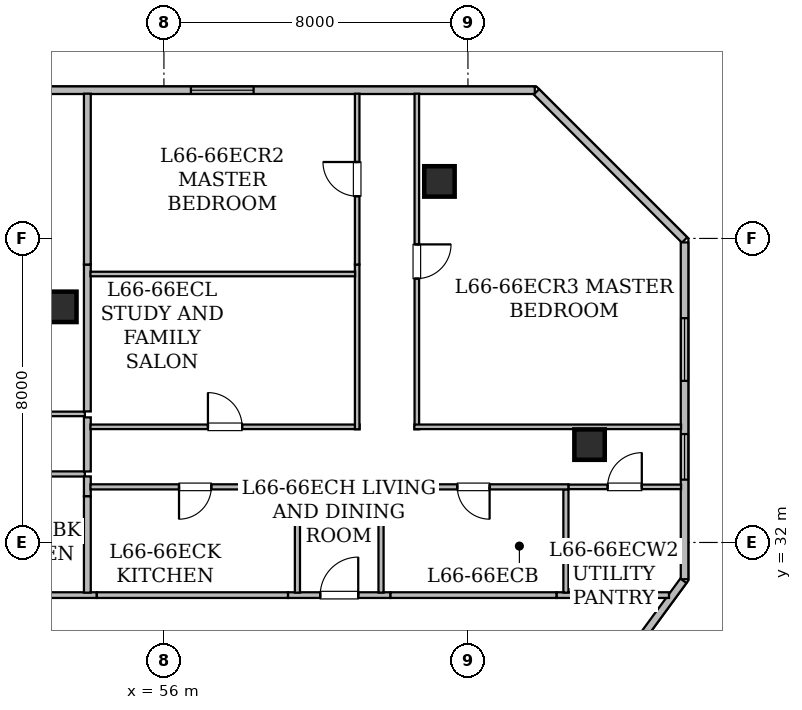
"""IFC4 building model, lengths in metres.
Left out: names, types, materials, properties, quantities, classifications, styles, units other than length and angle.
Written with IfcOpenShell. Run it as: python <this file> out.ifc"""

import sys

from ifc_helpers import new_model, si_unit, direction, frame, frame_2d, origin, origin_2d, place, context, subcontext, project, spatial, rectangle, hollow_rectangle, extrude, element, fill, save


model = new_model("IFC4")
c1 = context("Model", 3, precision=1e-05, world=origin(), true_north=direction((0.0, 1.0)))
c2 = subcontext(c1, "Body", "Model", "MODEL_VIEW")
j1 = project(units=[si_unit("LENGTHUNIT", "METRE"), si_unit("PLANEANGLEUNIT", "RADIAN")], contexts=[c1])
p1 = place(None, origin())
s1 = spatial("IfcSite", under=j1, at=p1, CompositionType="ELEMENT")
p2 = place(p1, origin())
s2 = spatial("IfcBuilding", under=s1, at=p2, CompositionType="ELEMENT")
p3 = place(p2, frame((0.0, 0.0, 257.35)))
s3 = spatial("IfcBuildingStorey", under=s2, at=p3, CompositionType="ELEMENT", Elevation=257.35)
for number, where, z_axis, x_axis in (
    (1, (63.25, 41.5, 0.0), (0.0, 0.0, 1.0), (1.0, 0.0, 0.0)),
    (2, (67.2, 34.575, 0.0), (0.0, 0.0, 1.0), (1.0, 0.0, 0.0)),
    (3, (53.3, 38.2, 0.0), (0.0, 0.0, 1.0), (1.0, 0.0, 0.0)),
):
    element("IfcColumn", number, at=place(p3, frame(where, z_axis=z_axis, x_axis=x_axis)), inside=s3, PredefinedType="COLUMN", context=c2, shape_type="SweptSolid", body=[
        extrude(hollow_rectangle(XDim=0.8, YDim=0.8, WallThickness=0.04, at=origin_2d()), origin(), (0.0, 0.0, 1.0), 3.65),
    ])
p4 = place(p3, frame((24.302, 43.9, 0.0), z_axis=(0.0, 0.0, 1.0), x_axis=(1.0, 0.0, 0.0)))
e4 = element("IfcWall", 4, at=p4, inside=s3, PredefinedType="STANDARD", context=c2, shape_type="SweptSolid", body=[
    extrude(rectangle(XDim=41.457, YDim=0.2, at=frame_2d((20.729, 0.0))), origin(), (0.0, 0.0, 1.0), 3.43),
])
p5 = place(p4, frame((0.604, 0.0, 0.85)))
e5 = element("IfcOpeningElement", 5, at=p5, cuts=e4, PredefinedType="OPENING", context=c2, shape_type="SweptSolid", body=[
    extrude(rectangle(XDim=1.65, YDim=1.55, at=frame_2d((0.825, 0.775))), frame((0.0, 0.11, 0.0), z_axis=(0.0, -1.0, 0.0), x_axis=(1.0, 0.0, 0.0)), (0.0, 0.0, 1.0), 0.22),
])
p6 = place(p4, frame((9.098, 0.0, 0.85)))
e6 = element("IfcOpeningElement", 6, at=p6, cuts=e4, PredefinedType="OPENING", context=c2, shape_type="SweptSolid", body=[
    extrude(rectangle(XDim=1.65, YDim=1.55, at=frame_2d((0.825, 0.775))), frame((0.0, 0.11, 0.0), z_axis=(0.0, -1.0, 0.0), x_axis=(1.0, 0.0, 0.0)), (0.0, 0.0, 1.0), 0.22),
])
p7 = place(p4, frame((14.405, 0.0, 0.85)))
e7 = element("IfcOpeningElement", 7, at=p7, cuts=e4, PredefinedType="OPENING", context=c2, shape_type="SweptSolid", body=[
    extrude(rectangle(XDim=1.65, YDim=1.55, at=frame_2d((0.825, 0.775))), frame((0.0, 0.11, 0.0), z_axis=(0.0, -1.0, 0.0), x_axis=(1.0, 0.0, 0.0)), (0.0, 0.0, 1.0), 0.22),
])
p8 = place(p4, frame((22.898, 0.0, 0.8)))
e8 = element("IfcOpeningElement", 8, at=p8, cuts=e4, PredefinedType="OPENING", context=c2, shape_type="SweptSolid", body=[
    extrude(rectangle(XDim=1.2, YDim=1.5, at=frame_2d((0.6, 0.75))), frame((0.0, 0.11, 0.0), z_axis=(0.0, -1.0, 0.0), x_axis=(1.0, 0.0, 0.0)), (0.0, 0.0, 1.0), 0.22),
])
p9 = place(p4, frame((19.188, 0.0, 0.85)))
e9 = element("IfcOpeningElement", 9, at=p9, cuts=e4, PredefinedType="OPENING", context=c2, shape_type="SweptSolid", body=[
    extrude(rectangle(XDim=1.65, YDim=1.55, at=frame_2d((0.825, 0.775))), frame((0.0, 0.11, 0.0), z_axis=(0.0, -1.0, 0.0), x_axis=(1.0, 0.0, 0.0)), (0.0, 0.0, 1.0), 0.22),
])
p10 = place(p4, frame((26.158, 0.0, 0.85)))
e10 = element("IfcOpeningElement", 10, at=p10, cuts=e4, PredefinedType="OPENING", context=c2, shape_type="SweptSolid", body=[
    extrude(rectangle(XDim=1.65, YDim=1.55, at=frame_2d((0.825, 0.775))), frame((0.0, 0.11, 0.0), z_axis=(0.0, -1.0, 0.0), x_axis=(1.0, 0.0, 0.0)), (0.0, 0.0, 1.0), 0.22),
])
p11 = place(p4, frame((32.408, 0.0, 0.85)))
e11 = element("IfcOpeningElement", 11, at=p11, cuts=e4, PredefinedType="OPENING", context=c2, shape_type="SweptSolid", body=[
    extrude(rectangle(XDim=1.65, YDim=1.55, at=frame_2d((0.825, 0.775))), frame((0.0, 0.11, 0.0), z_axis=(0.0, -1.0, 0.0), x_axis=(1.0, 0.0, 0.0)), (0.0, 0.0, 1.0), 0.22),
])
p12 = place(p3, frame((65.802, 43.857, 0.0), z_axis=(0.0, 0.0, 1.0), x_axis=(0.707106781187, -0.707106781187, 0.0)))
e12 = element("IfcWall", 12, at=p12, inside=s3, PredefinedType="STANDARD", context=c2, shape_type="SweptSolid", body=[
    extrude(rectangle(XDim=5.512, YDim=0.2, at=frame_2d((2.756, 0.0))), origin(), (0.0, 0.0, 1.0), 3.43),
])
p13 = place(p3, frame((69.7, 39.896, 0.0), z_axis=(0.0, 0.0, 1.0), x_axis=(0.0, -1.0, 0.0)))
e13 = element("IfcWall", 13, at=p13, inside=s3, PredefinedType="STANDARD", context=c2, shape_type="SweptSolid", body=[
    extrude(rectangle(XDim=8.863, YDim=0.2, at=frame_2d((4.432, 0.0))), origin(), (0.0, 0.0, 1.0), 3.43),
])
p14 = place(p13, frame((5.043, 0.0, 0.8)))
e14 = element("IfcOpeningElement", 14, at=p14, cuts=e13, PredefinedType="OPENING", context=c2, shape_type="SweptSolid", body=[
    extrude(rectangle(XDim=1.2, YDim=1.5, at=frame_2d((0.6, 0.75))), frame((0.0, 0.11, 0.0), z_axis=(0.0, -1.0, 0.0), x_axis=(1.0, 0.0, 0.0)), (0.0, 0.0, 1.0), 0.22),
])
p15 = place(p13, frame((1.994, 0.0, 0.85)))
e15 = element("IfcOpeningElement", 15, at=p15, cuts=e13, PredefinedType="OPENING", context=c2, shape_type="SweptSolid", body=[
    extrude(rectangle(XDim=1.65, YDim=1.55, at=frame_2d((0.825, 0.775))), frame((0.0, 0.11, 0.0), z_axis=(0.0, -1.0, 0.0), x_axis=(1.0, 0.0, 0.0)), (0.0, 0.0, 1.0), 0.22),
])
p16 = place(p3, frame((69.67, 30.992, 0.0), z_axis=(0.0, 0.0, 1.0), x_axis=(-0.591320870733, -0.806436375566, 0.0)))
e16 = element("IfcWall", 16, at=p16, inside=s3, PredefinedType="STANDARD", context=c2, shape_type="SweptSolid", body=[
    extrude(rectangle(XDim=3.71, YDim=0.2, at=frame_2d((1.855, 0.0))), origin(), (0.0, 0.0, 1.0), 3.43),
])
p17 = place(p3, frame((49.149, 30.615, 0.0), z_axis=(0.0, 0.0, 1.0), x_axis=(1.0, 0.0, 0.0)))
e17 = element("IfcWall", 17, at=p17, inside=s3, PredefinedType="STANDARD", context=c2, shape_type="SweptSolid", body=[
    extrude(rectangle(XDim=5.085, YDim=0.15, at=frame_2d((2.542, 0.0))), origin(), (0.0, 0.0, 1.0), 2.725),
])
p18 = place(p3, frame((66.329, 30.615, 0.0), z_axis=(0.0, 0.0, 1.0), x_axis=(1.0, 0.0, 0.0)))
e18 = element("IfcWall", 18, at=p18, inside=s3, PredefinedType="STANDARD", context=c2, shape_type="SweptSolid", body=[
    extrude(rectangle(XDim=2.961, YDim=0.15, at=frame_2d((1.48, 0.0))), origin(), (0.0, 0.0, 1.0), 2.887),
])
p19 = place(p3, frame((59.264, 30.615, 0.0), z_axis=(0.0, 0.0, 1.0), x_axis=(1.0, 0.0, 0.0)))
e19 = element("IfcWall", 19, at=p19, inside=s3, PredefinedType="STANDARD", context=c2, shape_type="SweptSolid", body=[
    extrude(rectangle(XDim=2.698, YDim=0.15, at=frame_2d((1.349, 0.0))), origin(), (0.0, 0.0, 1.0), 3.43),
])
p20 = place(p19, frame((0.849, 0.0, 0.0)))
e20 = element("IfcOpeningElement", 20, at=p20, cuts=e19, PredefinedType="OPENING", context=c2, shape_type="SweptSolid", body=[
    extrude(rectangle(XDim=1.0, YDim=2.15, at=frame_2d((0.5, 1.075))), frame((0.0, 0.085, 0.0), z_axis=(0.0, -1.0, 0.0), x_axis=(1.0, 0.0, 0.0)), (0.0, 0.0, 1.0), 0.17),
])
p21 = place(p3, frame((61.962, 30.615, 0.0), z_axis=(0.0, 0.0, 1.0), x_axis=(1.0, 0.0, 0.0)))
e21 = element("IfcWall", 21, at=p21, inside=s3, PredefinedType="STANDARD", context=c2, shape_type="SweptSolid", body=[
    extrude(rectangle(XDim=4.367, YDim=0.15, at=frame_2d((2.184, 0.0))), origin(), (0.0, 0.0, 1.0), 3.43),
])
p22 = place(p3, frame((54.234, 30.615, 0.0), z_axis=(0.0, 0.0, 1.0), x_axis=(1.0, 0.0, 0.0)))
e22 = element("IfcWall", 22, at=p22, inside=s3, PredefinedType="STANDARD", context=c2, shape_type="SweptSolid", body=[
    extrude(rectangle(XDim=5.03, YDim=0.15, at=frame_2d((2.515, 0.0))), origin(), (0.0, 0.0, 1.0), 3.43),
])
p23 = place(p3, frame((53.92, 33.803, 0.0), z_axis=(0.0, 0.0, 1.0), x_axis=(-1.0, 0.0, 0.0)))
e23 = element("IfcWall", 23, at=p23, inside=s3, PredefinedType="PARTITIONING", context=c2, shape_type="SweptSolid", body=[
    extrude(rectangle(XDim=5.085, YDim=0.135, at=frame_2d((2.542, 0.0))), origin(), (0.0, 0.0, 1.0), 2.725),
])
p24 = place(p23, frame((2.118, 0.0, 0.0)))
e24 = element("IfcOpeningElement", 24, at=p24, cuts=e23, PredefinedType="OPENING", context=c2, shape_type="SweptSolid", body=[
    extrude(rectangle(XDim=0.85, YDim=2.1, at=frame_2d((0.425, 1.05))), frame((0.0, 0.077, 0.0), z_axis=(0.0, -1.0, 0.0), x_axis=(1.0, 0.0, 0.0)), (0.0, 0.0, 1.0), 0.155),
])
p25 = place(p3, frame((48.52, 35.383, 0.0), z_axis=(0.0, 0.0, 1.0), x_axis=(1.0, 0.0, 0.0)))
e25 = element("IfcWall", 25, at=p25, inside=s3, PredefinedType="PARTITIONING", context=c2, shape_type="SweptSolid", body=[
    extrude(rectangle(XDim=5.4, YDim=0.12, at=frame_2d((2.7, 0.0))), origin(), (0.0, 0.0, 1.0), 2.725),
])
p26 = place(p3, frame((53.985, 35.292, 0.0), z_axis=(0.0, 0.0, 1.0), x_axis=(0.0, -1.0, 0.0)))
e26 = element("IfcWall", 26, at=p26, inside=s3, PredefinedType="STANDARD", context=c2, shape_type="SweptSolid", body=[
    extrude(rectangle(XDim=1.424, YDim=0.18, at=frame_2d((0.712, 0.0))), origin(), (0.0, 0.0, 1.0), 3.43),
])
p27 = place(p3, frame((53.985, 33.738, 0.0), z_axis=(0.0, 0.0, 1.0), x_axis=(0.0, -1.0, 0.0)))
e27 = element("IfcWall", 27, at=p27, inside=s3, PredefinedType="STANDARD", context=c2, shape_type="SweptSolid", body=[
    extrude(rectangle(XDim=0.524, YDim=0.18, at=frame_2d((0.262, 0.0))), origin(), (0.0, 0.0, 1.0), 3.065),
])
p28 = place(p3, frame((53.985, 33.214, 0.0), z_axis=(0.0, 0.0, 1.0), x_axis=(0.0, -1.0, 0.0)))
e28 = element("IfcWall", 28, at=p28, inside=s3, PredefinedType="STANDARD", context=c2, shape_type="SweptSolid", body=[
    extrude(rectangle(XDim=2.534, YDim=0.18, at=frame_2d((1.267, 0.0))), origin(), (0.0, 0.0, 1.0), 3.43),
])
p29 = place(p3, frame((53.985, 39.313, 0.0), z_axis=(0.0, 0.0, 1.0), x_axis=(0.0, -1.0, 0.0)))
e29 = element("IfcWall", 29, at=p29, inside=s3, PredefinedType="STANDARD", context=c2, shape_type="SweptSolid", body=[
    extrude(rectangle(XDim=3.865, YDim=0.18, at=frame_2d((1.933, 0.0))), origin(), (0.0, 0.0, 1.0), 2.725),
])
p30 = place(p3, frame((53.985, 43.808, 0.0), z_axis=(0.0, 0.0, 1.0), x_axis=(0.0, -1.0, 0.0)))
e30 = element("IfcWall", 30, at=p30, inside=s3, PredefinedType="STANDARD", context=c2, shape_type="SweptSolid", body=[
    extrude(rectangle(XDim=4.495, YDim=0.18, at=frame_2d((2.248, 0.0))), origin(), (0.0, 0.0, 1.0), 2.887),
])
p31 = place(p3, frame((66.643, 33.463, 0.0), z_axis=(0.0, 0.0, 1.0), x_axis=(1.0, 0.0, 0.0)))
e31 = element("IfcWall", 31, at=p31, inside=s3, PredefinedType="PARTITIONING", context=c2, shape_type="SweptSolid", body=[
    extrude(rectangle(XDim=2.965, YDim=0.12, at=frame_2d((1.482, 0.0))), origin(), (0.0, 0.0, 1.0), 2.887),
])
p32 = place(p31, frame((1.032, 0.0, 0.0)))
e32 = element("IfcOpeningElement", 32, at=p32, cuts=e31, PredefinedType="OPENING", context=c2, shape_type="SweptSolid", body=[
    extrude(rectangle(XDim=0.9, YDim=2.1, at=frame_2d((0.45, 1.05))), frame((0.0, 0.07, 0.0), z_axis=(0.0, -1.0, 0.0), x_axis=(1.0, 0.0, 0.0)), (0.0, 0.0, 1.0), 0.14),
])
p33 = place(p3, frame((66.578, 30.68, 0.0), z_axis=(0.0, 0.0, 1.0), x_axis=(0.0, 1.0, 0.0)))
e33 = element("IfcWall", 33, at=p33, inside=s3, PredefinedType="PARTITIONING", context=c2, shape_type="SweptSolid", body=[
    extrude(rectangle(XDim=2.718, YDim=0.135, at=frame_2d((1.359, 0.0))), origin(), (0.0, 0.0, 1.0), 3.065),
])
p34 = place(p3, frame((66.643, 33.463, 0.0), z_axis=(0.0, 0.0, 1.0), x_axis=(-1.0, 0.0, 0.0)))
e34 = element("IfcWall", 34, at=p34, inside=s3, PredefinedType="PARTITIONING", context=c2, shape_type="SweptSolid", body=[
    extrude(rectangle(XDim=4.995, YDim=0.135, at=frame_2d((2.498, 0.0))), origin(), (0.0, 0.0, 1.0), 3.065),
])
p35 = place(p34, frame((2.073, 0.0, 0.0)))
e35 = element("IfcOpeningElement", 35, at=p35, cuts=e34, PredefinedType="OPENING", context=c2, shape_type="SweptSolid", body=[
    extrude(rectangle(XDim=0.85, YDim=2.1, at=frame_2d((0.425, 1.05))), frame((0.0, 0.077, 0.0), z_axis=(0.0, -1.0, 0.0), x_axis=(1.0, 0.0, 0.0)), (0.0, 0.0, 1.0), 0.155),
])
for number, where, z_axis, x_axis in (
    (36, (61.713, 33.528, 0.0), (0.0, 0.0, 1.0), (0.0, -1.0, 0.0)),
    (37, (59.513, 30.68, 0.0), (0.0, 0.0, 1.0), (0.0, 1.0, 0.0)),
):
    element("IfcWall", number, at=place(p3, frame(where, z_axis=z_axis, x_axis=x_axis)), inside=s3, PredefinedType="PARTITIONING", context=c2, shape_type="SweptSolid", body=[
        extrude(rectangle(XDim=2.848, YDim=0.135, at=frame_2d((1.424, 0.0))), origin(), (0.0, 0.0, 1.0), 3.065),
    ])
p36 = place(p3, frame((59.578, 33.463, 0.0), z_axis=(0.0, 0.0, 1.0), x_axis=(-1.0, 0.0, 0.0)))
e38 = element("IfcWall", 38, at=p36, inside=s3, PredefinedType="PARTITIONING", context=c2, shape_type="SweptSolid", body=[
    extrude(rectangle(XDim=5.511, YDim=0.135, at=frame_2d((2.755, 0.0))), origin(), (0.0, 0.0, 1.0), 3.065),
])
p37 = place(p36, frame((2.331, 0.0, 0.0)))
e39 = element("IfcOpeningElement", 39, at=p37, cuts=e38, PredefinedType="OPENING", context=c2, shape_type="SweptSolid", body=[
    extrude(rectangle(XDim=0.85, YDim=2.1, at=frame_2d((0.425, 1.05))), frame((0.0, 0.077, 0.0), z_axis=(0.0, -1.0, 0.0), x_axis=(1.0, 0.0, 0.0)), (0.0, 0.0, 1.0), 0.155),
])
p38 = place(p3, frame((54.067, 35.043, 0.0), z_axis=(0.0, 0.0, 1.0), x_axis=(1.0, 0.0, 0.0)))
e40 = element("IfcWall", 40, at=p38, inside=s3, PredefinedType="PARTITIONING", context=c2, shape_type="SweptSolid", body=[
    extrude(rectangle(XDim=7.083, YDim=0.12, at=frame_2d((3.542, 0.0))), origin(), (0.0, 0.0, 1.0), 3.43),
])
p39 = place(p38, frame((3.091, 0.0, 0.0)))
e41 = element("IfcOpeningElement", 41, at=p39, cuts=e40, PredefinedType="OPENING", context=c2, shape_type="SweptSolid", body=[
    extrude(rectangle(XDim=0.9, YDim=2.1, at=frame_2d((0.45, 1.05))), frame((0.0, 0.07, 0.0), z_axis=(0.0, -1.0, 0.0), x_axis=(1.0, 0.0, 0.0)), (0.0, 0.0, 1.0), 0.14),
])
p40 = place(p3, frame((61.085, 34.978, 0.0), z_axis=(0.0, 0.0, 1.0), x_axis=(0.0, 1.0, 0.0)))
e42 = element("IfcWall", 42, at=p40, inside=s3, PredefinedType="PARTITIONING", context=c2, shape_type="SweptSolid", body=[
    extrude(rectangle(XDim=4.335, YDim=0.12, at=frame_2d((2.167, 0.0))), origin(), (0.0, 0.0, 1.0), 2.725),
])
p41 = place(p3, frame((61.085, 39.313, 0.0), z_axis=(0.0, 0.0, 1.0), x_axis=(0.0, 1.0, 0.0)))
e43 = element("IfcWall", 43, at=p41, inside=s3, PredefinedType="PARTITIONING", context=c2, shape_type="SweptSolid", body=[
    extrude(rectangle(XDim=4.495, YDim=0.12, at=frame_2d((2.248, 0.0))), origin(), (0.0, 0.0, 1.0), 2.725),
])
p42 = place(p41, frame((1.798, 0.0, 0.0)))
e44 = element("IfcOpeningElement", 44, at=p42, cuts=e43, PredefinedType="OPENING", context=c2, shape_type="SweptSolid", body=[
    extrude(rectangle(XDim=0.9, YDim=2.1, at=frame_2d((0.45, 1.05))), frame((0.0, 0.07, 0.0), z_axis=(0.0, -1.0, 0.0), x_axis=(1.0, 0.0, 0.0)), (0.0, 0.0, 1.0), 0.14),
])
p43 = place(p3, frame((62.655, 43.808, 0.0), z_axis=(0.0, 0.0, 1.0), x_axis=(0.0, -1.0, 0.0)))
e45 = element("IfcWall", 45, at=p43, inside=s3, PredefinedType="PARTITIONING", context=c2, shape_type="SweptSolid", body=[
    extrude(rectangle(XDim=8.83, YDim=0.12, at=frame_2d((4.415, 0.0))), origin(), (0.0, 0.0, 1.0), 2.725),
])
p44 = place(p43, frame((3.965, 0.0, 0.0)))
e46 = element("IfcOpeningElement", 46, at=p44, cuts=e45, PredefinedType="OPENING", context=c2, shape_type="SweptSolid", body=[
    extrude(rectangle(XDim=0.9, YDim=2.1, at=frame_2d((0.45, 1.05))), frame((0.0, 0.07, 0.0), z_axis=(0.0, -1.0, 0.0), x_axis=(1.0, 0.0, 0.0)), (0.0, 0.0, 1.0), 0.14),
])
p45 = place(p3, frame((62.59, 35.043, 0.0), z_axis=(0.0, 0.0, 1.0), x_axis=(1.0, 0.0, 0.0)))
e47 = element("IfcWall", 47, at=p45, inside=s3, PredefinedType="PARTITIONING", context=c2, shape_type="SweptSolid", body=[
    extrude(rectangle(XDim=7.018, YDim=0.12, at=frame_2d((3.509, 0.0))), origin(), (0.0, 0.0, 1.0), 2.725),
])
p46 = place(p3, frame((54.067, 39.064, 0.0), z_axis=(0.0, 0.0, 1.0), x_axis=(1.0, 0.0, 0.0)))
e48 = element("IfcWall", 48, at=p46, inside=s3, PredefinedType="PARTITIONING", context=c2, shape_type="SweptSolid", body=[
    extrude(rectangle(XDim=6.964, YDim=0.12, at=frame_2d((3.482, 0.0))), origin(), (0.0, 0.0, 1.0), 2.725),
])
p47 = place(p14, origin())
e49 = element("IfcWindow", 49, at=p47, inside=s3, PartitioningType="SINGLE_PANEL", PredefinedType="WINDOW", context=c2, shape_type="SweptSolid", body=[
    extrude(rectangle(XDim=1.2, YDim=1.5, at=frame_2d((0.6, 0.75))), frame((0.0, 0.03, 0.0), z_axis=(0.0, -1.0, 0.0), x_axis=(1.0, 0.0, 0.0)), (0.0, 0.0, 1.0), 0.06),
])
fill(e14, e49)
p48 = place(p11, origin())
e50 = element("IfcWindow", 50, at=p48, inside=s3, PartitioningType="SINGLE_PANEL", PredefinedType="WINDOW", context=c2, shape_type="SweptSolid", body=[
    extrude(rectangle(XDim=1.65, YDim=1.55, at=frame_2d((0.825, 0.775))), frame((0.0, 0.03, 0.0), z_axis=(0.0, -1.0, 0.0), x_axis=(1.0, 0.0, 0.0)), (0.0, 0.0, 1.0), 0.06),
])
fill(e11, e50)
p49 = place(p15, origin())
e51 = element("IfcWindow", 51, at=p49, inside=s3, PartitioningType="SINGLE_PANEL", PredefinedType="WINDOW", context=c2, shape_type="SweptSolid", body=[
    extrude(rectangle(XDim=1.65, YDim=1.55, at=frame_2d((0.825, 0.775))), frame((0.0, 0.03, 0.0), z_axis=(0.0, -1.0, 0.0), x_axis=(1.0, 0.0, 0.0)), (0.0, 0.0, 1.0), 0.06),
])
fill(e15, e51)
p50 = place(p20, origin())
e52 = element("IfcDoor", 52, at=p50, inside=s3, OperationType="SINGLE_SWING_RIGHT", PredefinedType="DOOR", context=c2, shape_type="SweptSolid", body=[
    extrude(rectangle(XDim=1.0, YDim=2.15, at=frame_2d((0.5, 1.075))), frame((0.0, 0.025, 0.0), z_axis=(0.0, -1.0, 0.0), x_axis=(1.0, 0.0, 0.0)), (0.0, 0.0, 1.0), 0.05),
])
fill(e20, e52)
p51 = place(p32, origin())
e53 = element("IfcDoor", 53, at=p51, inside=s3, OperationType="SINGLE_SWING_RIGHT", PredefinedType="DOOR", context=c2, shape_type="SweptSolid", body=[
    extrude(rectangle(XDim=0.9, YDim=2.1, at=frame_2d((0.45, 1.05))), frame((0.0, 0.025, 0.0), z_axis=(0.0, -1.0, 0.0), x_axis=(1.0, 0.0, 0.0)), (0.0, 0.0, 1.0), 0.05),
])
fill(e32, e53)
p52 = place(p35, origin())
e54 = element("IfcDoor", 54, at=p52, inside=s3, OperationType="SINGLE_SWING_LEFT", PredefinedType="DOOR", context=c2, shape_type="SweptSolid", body=[
    extrude(rectangle(XDim=0.85, YDim=2.1, at=frame_2d((0.425, 1.05))), frame((0.0, 0.025, 0.0), z_axis=(0.0, -1.0, 0.0), x_axis=(1.0, 0.0, 0.0)), (0.0, 0.0, 1.0), 0.05),
])
fill(e35, e54)
p53 = place(p37, origin())
e55 = element("IfcDoor", 55, at=p53, inside=s3, OperationType="SINGLE_SWING_RIGHT", PredefinedType="DOOR", context=c2, shape_type="SweptSolid", body=[
    extrude(rectangle(XDim=0.85, YDim=2.1, at=frame_2d((0.425, 1.05))), frame((0.0, 0.025, 0.0), z_axis=(0.0, -1.0, 0.0), x_axis=(1.0, 0.0, 0.0)), (0.0, 0.0, 1.0), 0.05),
])
fill(e39, e55)
p54 = place(p39, origin())
e56 = element("IfcDoor", 56, at=p54, inside=s3, OperationType="SINGLE_SWING_LEFT", PredefinedType="DOOR", context=c2, shape_type="SweptSolid", body=[
    extrude(rectangle(XDim=0.9, YDim=2.1, at=frame_2d((0.45, 1.05))), frame((0.0, 0.025, 0.0), z_axis=(0.0, -1.0, 0.0), x_axis=(1.0, 0.0, 0.0)), (0.0, 0.0, 1.0), 0.05),
])
fill(e41, e56)
p55 = place(p42, origin())
e57 = element("IfcDoor", 57, at=p55, inside=s3, OperationType="SINGLE_SWING_RIGHT", PredefinedType="DOOR", context=c2, shape_type="SweptSolid", body=[
    extrude(rectangle(XDim=0.9, YDim=2.1, at=frame_2d((0.45, 1.05))), frame((0.0, 0.025, 0.0), z_axis=(0.0, -1.0, 0.0), x_axis=(1.0, 0.0, 0.0)), (0.0, 0.0, 1.0), 0.05),
])
fill(e44, e57)
p56 = place(p44, origin())
e58 = element("IfcDoor", 58, at=p56, inside=s3, OperationType="SINGLE_SWING_LEFT", PredefinedType="DOOR", context=c2, shape_type="SweptSolid", body=[
    extrude(rectangle(XDim=0.9, YDim=2.1, at=frame_2d((0.45, 1.05))), frame((0.0, 0.025, 0.0), z_axis=(0.0, -1.0, 0.0), x_axis=(1.0, 0.0, 0.0)), (0.0, 0.0, 1.0), 0.05),
])
fill(e46, e58)
save(model, sys.argv[1])
